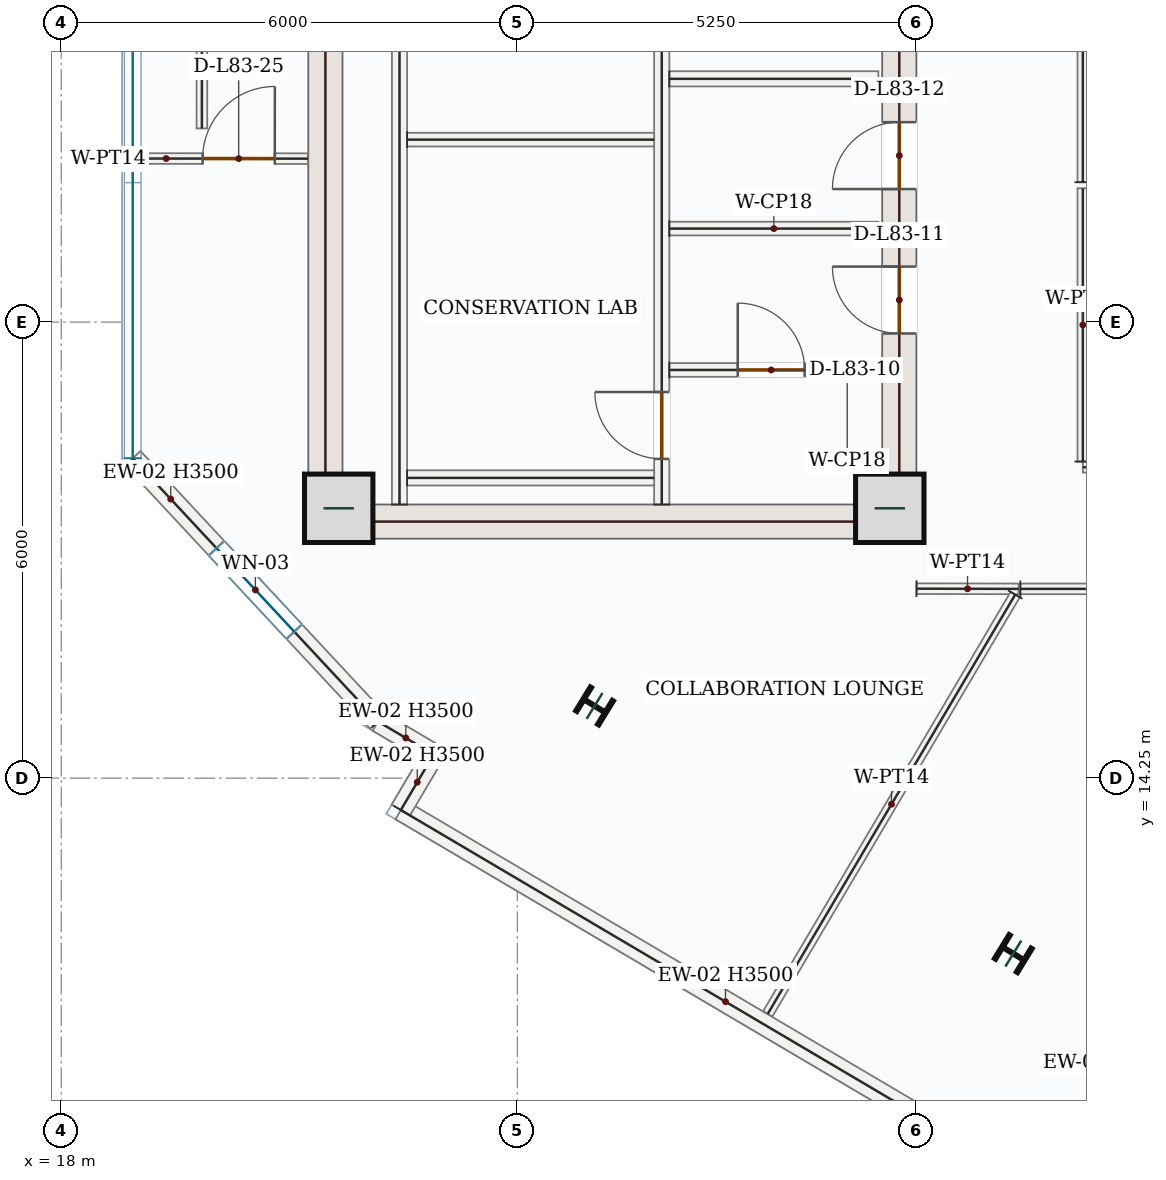
"""IFC4 building model, lengths in metres.
Left out: names, types, materials, properties, quantities, classifications, styles, units other than length and angle.
Written with IfcOpenShell. Run it as: python <this file> out.ifc"""

import sys

from ifc_helpers import new_model, si_unit, direction, frame, frame_2d, origin, origin_2d, place, context, subcontext, project, spatial, rectangle, i_section, extrude, source, transform, mapped, element, fill, save


model = new_model("IFC4")
c1 = context("Model", 3, precision=1e-05, world=origin(), true_north=direction((0.0, 1.0)))
c2 = subcontext(c1, "Body", "Model", "MODEL_VIEW")
j1 = project(units=[si_unit("LENGTHUNIT", "METRE"), si_unit("PLANEANGLEUNIT", "RADIAN")], contexts=[c1])
p1 = place(None, origin())
s1 = spatial("IfcSite", under=j1, at=p1, CompositionType="ELEMENT")
p2 = place(p1, origin())
s2 = spatial("IfcBuilding", under=s1, at=p2, CompositionType="ELEMENT")
p3 = place(p2, frame((0.0, 0.0, 342.3)))
s3 = spatial("IfcBuildingStorey", under=s2, at=p3, CompositionType="ELEMENT", Elevation=342.3)
m1 = source(origin(), c2, "Body", "SweptSolid", [
    extrude(rectangle(XDim=8.55, YDim=0.45, at=frame_2d((4.275, 0.0))), origin(), (0.0, 0.0, 1.0), 3.5),
])
p4 = place(p3, frame((21.475, 17.4, 0.0), z_axis=(0.0, 0.0, 1.0), x_axis=(0.0, 1.0, 0.0)))
e1 = element("IfcWall", 1, at=p4, inside=s3, PredefinedType="SHEAR", context=c2, shape_type="MappedRepresentation", body=[
    mapped(m1, transform((0.0, 0.0, 0.0), x_axis=(1.0, 0.0, 0.0), y_axis=(0.0, 1.0, 0.0), z_axis=(0.0, 0.0, 1.0), scale=1.0)),
])
p5 = place(p3, frame((29.025, 17.4, 0.0), z_axis=(0.0, 0.0, 1.0), x_axis=(0.0, 1.0, 0.0)))
e2 = element("IfcWall", 2, at=p5, inside=s3, PredefinedType="SHEAR", context=c2, shape_type="SweptSolid", body=[
    extrude(rectangle(XDim=8.55, YDim=0.45, at=frame_2d((4.275, 0.0))), origin(), (0.0, 0.0, 1.0), 3.5),
])
p6 = place(p5, frame((6.65, 0.0, 0.0)))
e3 = element("IfcOpeningElement", 3, at=p6, cuts=e2, PredefinedType="OPENING", context=c2, shape_type="SweptSolid", body=[
    extrude(rectangle(XDim=1.1, YDim=2.2, at=frame_2d((0.55, 1.1))), frame((0.0, 0.235, 0.0), z_axis=(0.0, -1.0, 0.0), x_axis=(1.0, 0.0, 0.0)), (0.0, 0.0, 1.0), 0.47),
])
p7 = place(p5, frame((2.7, 0.0, 0.0)))
e4 = element("IfcOpeningElement", 4, at=p7, cuts=e2, PredefinedType="OPENING", context=c2, shape_type="SweptSolid", body=[
    extrude(rectangle(XDim=0.88, YDim=2.1, at=frame_2d((0.44, 1.05))), frame((0.0, 0.235, 0.0), z_axis=(0.0, -1.0, 0.0), x_axis=(1.0, 0.0, 0.0)), (0.0, 0.0, 1.0), 0.47),
])
p8 = place(p5, frame((4.6, 0.0, 0.0)))
e5 = element("IfcOpeningElement", 5, at=p8, cuts=e2, PredefinedType="OPENING", context=c2, shape_type="SweptSolid", body=[
    extrude(rectangle(XDim=0.88, YDim=2.1, at=frame_2d((0.44, 1.05))), frame((0.0, 0.235, 0.0), z_axis=(0.0, -1.0, 0.0), x_axis=(1.0, 0.0, 0.0)), (0.0, 0.0, 1.0), 0.47),
])
m2 = source(origin(), c2, "Body", "SweptSolid", [
    extrude(rectangle(XDim=7.1, YDim=0.45, at=frame_2d((3.55, 0.0))), origin(), (0.0, 0.0, 1.0), 3.5),
])
p9 = place(p3, frame((21.7, 17.625, 0.0), z_axis=(0.0, 0.0, 1.0), x_axis=(1.0, 0.0, 0.0)))
e6 = element("IfcWall", 6, at=p9, inside=s3, PredefinedType="SHEAR", context=c2, shape_type="MappedRepresentation", body=[
    mapped(m2, transform((0.0, 0.0, 0.0), x_axis=(1.0, 0.0, 0.0), y_axis=(0.0, 1.0, 0.0), z_axis=(0.0, 0.0, 1.0), scale=1.0)),
])
m3 = source(origin(), c2, "Body", "SweptSolid", [
    extrude(rectangle(XDim=0.9, YDim=0.9, at=origin_2d()), origin(), (0.0, 0.0, 1.0), 3.75),
])
for number, where, z_axis, x_axis in (
    (7, (21.65, 17.8, 0.0), (0.0, 0.0, 1.0), (1.0, 0.0, 0.0)),
    (8, (28.9, 17.8, 0.0), (0.0, 0.0, 1.0), (1.0, 0.0, 0.0)),
):
    element("IfcColumn", number, at=place(p3, frame(where, z_axis=z_axis, x_axis=x_axis)), inside=s3, PredefinedType="COLUMN", context=c2, shape_type="MappedRepresentation", body=[
        mapped(m3, transform((0.0, 0.0, 0.0), x_axis=(1.0, 0.0, 0.0), y_axis=(0.0, 1.0, 0.0), z_axis=(0.0, 0.0, 1.0), scale=1.0)),
    ])
m4 = source(origin(), c2, "Body", "SweptSolid", [
    extrude(i_section(OverallWidth=0.369, OverallDepth=0.356, WebThickness=0.011, FlangeThickness=0.018, FilletRadius=0.018, at=origin_2d()), origin(), (0.0, 0.0, 1.0), 3.75),
])
for number, where, z_axis, x_axis in (
    (9, (25.016, 15.2, 0.0), (0.0, 0.0, 1.0), (0.522, 0.853, 0.0)),
    (10, (30.525, 11.942, 0.0), (0.0, 0.0, 1.0), (0.522, 0.853, 0.0)),
):
    element("IfcColumn", number, at=place(p3, frame(where, z_axis=z_axis, x_axis=x_axis)), inside=s3, PredefinedType="COLUMN", context=c2, shape_type="MappedRepresentation", body=[
        mapped(m4, transform((0.0, 0.0, 0.0), x_axis=(1.0, 0.0, 0.0), y_axis=(0.0, 1.0, 0.0), z_axis=(0.0, 0.0, 1.0), scale=1.0)),
    ])
m5 = source(origin(), c2, "Body", "SweptSolid", [
    extrude(rectangle(XDim=9.92, YDim=0.28, at=frame_2d((4.96, 0.0))), origin(), (0.0, 0.0, 1.0), 3.5),
])
p10 = place(p3, frame((31.01, 8.788, 0.0), z_axis=(0.0, 0.0, 1.0), x_axis=(-0.861192451778, 0.508279018848, 0.0)))
e11 = element("IfcWall", 11, at=p10, inside=s3, PredefinedType="SOLIDWALL", context=c2, shape_type="MappedRepresentation", body=[
    mapped(m5, transform((0.0, 0.0, 0.0), x_axis=(1.0, 0.0, 0.0), y_axis=(0.0, 1.0, 0.0), z_axis=(0.0, 0.0, 1.0), scale=1.0)),
])
m6 = source(origin(), c2, "Body", "SweptSolid", [
    extrude(rectangle(XDim=0.85, YDim=0.28, at=frame_2d((0.425, 0.0))), origin(), (0.0, 0.0, 1.0), 3.5),
])
for number, where, z_axis, x_axis in (
    (12, (22.467, 13.83, 0.0), (0.0, 0.0, 1.0), (0.508, 0.861, 0.0)),
    (13, (22.899, 14.562, 0.0), (0.0, 0.0, 1.0), (-0.861, 0.508, 0.0)),
):
    element("IfcWall", number, at=place(p3, frame(where, z_axis=z_axis, x_axis=x_axis)), inside=s3, PredefinedType="SOLIDWALL", context=c2, shape_type="MappedRepresentation", body=[
        mapped(m6, transform((0.0, 0.0, 0.0), x_axis=(1.0, 0.0, 0.0), y_axis=(0.0, 1.0, 0.0), z_axis=(0.0, 0.0, 1.0), scale=1.0)),
    ])
p11 = place(p3, frame((22.167, 14.994, 0.0), z_axis=(0.0, 0.0, 1.0), x_axis=(-0.681733754317, 0.731600361006, 0.0)))
e14 = element("IfcWall", 14, at=p11, inside=s3, PredefinedType="SOLIDWALL", context=c2, shape_type="SweptSolid", body=[
    extrude(rectangle(XDim=4.734, YDim=0.28, at=frame_2d((2.367, 0.0))), origin(), (0.0, 0.0, 1.0), 3.5),
])
p12 = place(p11, frame((1.617, 0.0, 0.85)))
e15 = element("IfcOpeningElement", 15, at=p12, cuts=e14, PredefinedType="OPENING", context=c2, shape_type="SweptSolid", body=[
    extrude(rectangle(XDim=1.5, YDim=1.5, at=frame_2d((0.75, 0.75))), frame((0.0, 0.15, 0.0), z_axis=(0.0, -1.0, 0.0), x_axis=(1.0, 0.0, 0.0)), (0.0, 0.0, 1.0), 0.3),
])
m7 = source(origin(), c2, "Body", "SweptSolid", [
    extrude(rectangle(XDim=7.87, YDim=0.2, at=frame_2d((3.935, 0.0))), origin(), (0.0, 0.0, 1.0), 3.5),
])
p13 = place(p3, frame((22.45, 17.85, 0.0), z_axis=(0.0, 0.0, 1.0), x_axis=(0.0, 1.0, 0.0)))
e16 = element("IfcWall", 16, at=p13, inside=s3, PredefinedType="SOLIDWALL", context=c2, shape_type="MappedRepresentation", body=[
    mapped(m7, transform((0.0, 0.0, 0.0), x_axis=(1.0, 0.0, 0.0), y_axis=(0.0, 1.0, 0.0), z_axis=(0.0, 0.0, 1.0), scale=1.0)),
])
p14 = place(p3, frame((25.9, 17.85, 0.0), z_axis=(0.0, 0.0, 1.0), x_axis=(0.0, 1.0, 0.0)))
e17 = element("IfcWall", 17, at=p14, inside=s3, PredefinedType="SOLIDWALL", context=c2, shape_type="SweptSolid", body=[
    extrude(rectangle(XDim=8.0, YDim=0.2, at=frame_2d((4.0, 0.0))), origin(), (0.0, 0.0, 1.0), 3.5),
])
p15 = place(p14, frame((6.2, 0.0, 0.0)))
e18 = element("IfcOpeningElement", 18, at=p15, cuts=e17, PredefinedType="OPENING", context=c2, shape_type="SweptSolid", body=[
    extrude(rectangle(XDim=1.0, YDim=2.15, at=frame_2d((0.5, 1.075))), frame((0.0, 0.11, 0.0), z_axis=(0.0, -1.0, 0.0), x_axis=(1.0, 0.0, 0.0)), (0.0, 0.0, 1.0), 0.22),
])
p16 = place(p14, frame((0.6, 0.0, 0.0)))
e19 = element("IfcOpeningElement", 19, at=p16, cuts=e17, PredefinedType="OPENING", context=c2, shape_type="SweptSolid", body=[
    extrude(rectangle(XDim=0.88, YDim=2.1, at=frame_2d((0.44, 1.05))), frame((0.0, 0.11, 0.0), z_axis=(0.0, -1.0, 0.0), x_axis=(1.0, 0.0, 0.0)), (0.0, 0.0, 1.0), 0.22),
])
m8 = source(origin(), c2, "Body", "SweptSolid", [
    extrude(rectangle(XDim=3.25, YDim=0.2, at=frame_2d((1.625, 0.0))), origin(), (0.0, 0.0, 1.0), 3.5),
])
p17 = place(p3, frame((22.55, 18.2, 0.0), z_axis=(0.0, 0.0, 1.0), x_axis=(1.0, 0.0, 0.0)))
e20 = element("IfcWall", 20, at=p17, inside=s3, PredefinedType="SOLIDWALL", context=c2, shape_type="MappedRepresentation", body=[
    mapped(m8, transform((0.0, 0.0, 0.0), x_axis=(1.0, 0.0, 0.0), y_axis=(0.0, 1.0, 0.0), z_axis=(0.0, 0.0, 1.0), scale=1.0)),
])
m9 = source(origin(), c2, "Body", "SweptSolid", [
    extrude(rectangle(XDim=3.25, YDim=0.18, at=frame_2d((1.625, 0.0))), origin(), (0.0, 0.0, 1.0), 3.5),
])
p18 = place(p3, frame((22.55, 22.65, 0.0), z_axis=(0.0, 0.0, 1.0), x_axis=(1.0, 0.0, 0.0)))
e21 = element("IfcWall", 21, at=p18, inside=s3, PredefinedType="PARTITIONING", context=c2, shape_type="MappedRepresentation", body=[
    mapped(m9, transform((0.0, 0.0, 0.0), x_axis=(1.0, 0.0, 0.0), y_axis=(0.0, 1.0, 0.0), z_axis=(0.0, 0.0, 1.0), scale=1.0)),
])
m10 = source(origin(), c2, "Body", "SweptSolid", [
    extrude(rectangle(XDim=2.75, YDim=0.2, at=frame_2d((1.375, 0.0))), origin(), (0.0, 0.0, 1.0), 3.5),
])
p19 = place(p3, frame((26.0, 23.45, 0.0), z_axis=(0.0, 0.0, 1.0), x_axis=(1.0, 0.0, 0.0)))
e22 = element("IfcWall", 22, at=p19, inside=s3, PredefinedType="SOLIDWALL", context=c2, shape_type="MappedRepresentation", body=[
    mapped(m10, transform((0.0, 0.0, 0.0), x_axis=(1.0, 0.0, 0.0), y_axis=(0.0, 1.0, 0.0), z_axis=(0.0, 0.0, 1.0), scale=1.0)),
])
p20 = place(p3, frame((26.0, 19.62, 0.0), z_axis=(0.0, 0.0, 1.0), x_axis=(1.0, 0.0, 0.0)))
e23 = element("IfcWall", 23, at=p20, inside=s3, PredefinedType="PARTITIONING", context=c2, shape_type="SweptSolid", body=[
    extrude(rectangle(XDim=2.75, YDim=0.18, at=frame_2d((1.375, 0.0))), origin(), (0.0, 0.0, 1.0), 3.5),
])
p21 = place(p20, frame((0.9, 0.0, 0.0)))
e24 = element("IfcOpeningElement", 24, at=p21, cuts=e23, PredefinedType="OPENING", context=c2, shape_type="SweptSolid", body=[
    extrude(rectangle(XDim=0.88, YDim=2.1, at=frame_2d((0.44, 1.05))), frame((0.0, 0.1, 0.0), z_axis=(0.0, -1.0, 0.0), x_axis=(1.0, 0.0, 0.0)), (0.0, 0.0, 1.0), 0.2),
])
m11 = source(origin(), c2, "Body", "SweptSolid", [
    extrude(rectangle(XDim=2.75, YDim=0.18, at=frame_2d((1.375, 0.0))), origin(), (0.0, 0.0, 1.0), 3.5),
])
p22 = place(p3, frame((26.0, 21.48, 0.0), z_axis=(0.0, 0.0, 1.0), x_axis=(1.0, 0.0, 0.0)))
e25 = element("IfcWall", 25, at=p22, inside=s3, PredefinedType="PARTITIONING", context=c2, shape_type="MappedRepresentation", body=[
    mapped(m11, transform((0.0, 0.0, 0.0), x_axis=(1.0, 0.0, 0.0), y_axis=(0.0, 1.0, 0.0), z_axis=(0.0, 0.0, 1.0), scale=1.0)),
])
p23 = place(p3, frame((35.91, 18.34, 0.0), z_axis=(0.0, 0.0, 1.0), x_axis=(-1.0, 0.0, 0.0)))
e26 = element("IfcWall", 26, at=p23, inside=s3, PredefinedType="PARTITIONING", context=c2, shape_type="SweptSolid", body=[
    extrude(rectangle(XDim=4.47, YDim=0.14, at=frame_2d((2.235, 0.0))), origin(), (0.0, 0.0, 1.0), 3.5),
])
p24 = place(p23, frame((0.774, 0.0, 0.0)))
e27 = element("IfcOpeningElement", 27, at=p24, cuts=e26, PredefinedType="OPENING", context=c2, shape_type="SweptSolid", body=[
    extrude(rectangle(XDim=0.95, YDim=2.15, at=frame_2d((0.475, 1.075))), frame((0.0, 0.08, 0.0), z_axis=(0.0, -1.0, 0.0), x_axis=(1.0, 0.0, 0.0)), (0.0, 0.0, 1.0), 0.16),
])
m12 = source(origin(), c2, "Body", "SweptSolid", [
    extrude(rectangle(XDim=3.595, YDim=0.14, at=frame_2d((1.797, 0.0))), origin(), (0.0, 0.0, 1.0), 3.5),
])
p25 = place(p3, frame((31.44, 18.415, 0.0), z_axis=(0.0, 0.0, 1.0), x_axis=(0.0, 1.0, 0.0)))
e28 = element("IfcWall", 28, at=p25, inside=s3, PredefinedType="PARTITIONING", context=c2, shape_type="MappedRepresentation", body=[
    mapped(m12, transform((0.0, 0.0, 0.0), x_axis=(1.0, 0.0, 0.0), y_axis=(0.0, 1.0, 0.0), z_axis=(0.0, 0.0, 1.0), scale=1.0)),
])
m13 = source(origin(), c2, "Body", "SweptSolid", [
    extrude(rectangle(XDim=3.72, YDim=0.14, at=frame_2d((1.86, 0.0))), origin(), (0.0, 0.0, 1.0), 3.5),
])
p26 = place(p3, frame((31.44, 22.09, 0.0), z_axis=(0.0, 0.0, 1.0), x_axis=(0.0, 1.0, 0.0)))
e29 = element("IfcWall", 29, at=p26, inside=s3, PredefinedType="PARTITIONING", context=c2, shape_type="MappedRepresentation", body=[
    mapped(m13, transform((0.0, 0.0, 0.0), x_axis=(1.0, 0.0, 0.0), y_axis=(0.0, 1.0, 0.0), z_axis=(0.0, 0.0, 1.0), scale=1.0)),
])
p27 = place(p3, frame((19.05, 22.402, 0.0), z_axis=(0.0, 0.0, 1.0), x_axis=(0.999999696925, -0.000778556098, 0.0)))
e30 = element("IfcWall", 30, at=p27, inside=s3, PredefinedType="PARTITIONING", context=c2, shape_type="SweptSolid", body=[
    extrude(rectangle(XDim=2.195, YDim=0.14, at=frame_2d((1.098, 0.0))), origin(), (0.0, 0.0, 1.0), 3.5),
])
p28 = place(p27, frame((0.809, 0.0, 0.0)))
e31 = element("IfcOpeningElement", 31, at=p28, cuts=e30, PredefinedType="OPENING", context=c2, shape_type="SweptSolid", body=[
    extrude(rectangle(XDim=0.95, YDim=2.15, at=frame_2d((0.475, 1.075))), frame((0.0, 0.08, 0.0), z_axis=(0.0, -1.0, 0.0), x_axis=(1.0, 0.0, 0.0)), (0.0, 0.0, 1.0), 0.16),
])
m14 = source(origin(), c2, "Body", "SweptSolid", [
    extrude(rectangle(XDim=1.343, YDim=0.14, at=frame_2d((0.671, 0.0))), origin(), (0.0, 0.0, 1.0), 3.5),
])
p29 = place(p3, frame((29.252, 16.743, 0.0), z_axis=(0.0, 0.0, 1.0), x_axis=(0.999997619843, -0.002181812989, 0.0)))
e32 = element("IfcWall", 32, at=p29, inside=s3, PredefinedType="PARTITIONING", context=c2, shape_type="MappedRepresentation", body=[
    mapped(m14, transform((0.0, 0.0, 0.0), x_axis=(1.0, 0.0, 0.0), y_axis=(0.0, 1.0, 0.0), z_axis=(0.0, 0.0, 1.0), scale=1.0)),
])
m15 = source(origin(), c2, "Body", "SweptSolid", [
    extrude(rectangle(XDim=6.405, YDim=0.14, at=frame_2d((3.202, 0.0))), origin(), (0.0, 0.0, 1.0), 3.5),
])
p30 = place(p3, frame((30.55, 16.665, 0.0), z_axis=(0.0, 0.0, 1.0), x_axis=(-0.508299006291, -0.861180654801, 0.0)))
e33 = element("IfcWall", 33, at=p30, inside=s3, PredefinedType="PARTITIONING", context=c2, shape_type="MappedRepresentation", body=[
    mapped(m15, transform((0.0, 0.0, 0.0), x_axis=(1.0, 0.0, 0.0), y_axis=(0.0, 1.0, 0.0), z_axis=(0.0, 0.0, 1.0), scale=1.0)),
])
p31 = place(p3, frame((30.618, 16.74, 0.0), z_axis=(0.0, 0.0, 1.0), x_axis=(1.0, 0.0, 0.0)))
e34 = element("IfcWall", 34, at=p31, inside=s3, PredefinedType="PARTITIONING", context=c2, shape_type="SweptSolid", body=[
    extrude(rectangle(XDim=8.014, YDim=0.14, at=frame_2d((4.007, 0.0))), origin(), (0.0, 0.0, 1.0), 3.5),
])
p32 = place(p31, frame((4.592, 0.0, 0.0)))
e35 = element("IfcOpeningElement", 35, at=p32, cuts=e34, PredefinedType="OPENING", context=c2, shape_type="SweptSolid", body=[
    extrude(rectangle(XDim=0.95, YDim=2.15, at=frame_2d((0.475, 1.075))), frame((0.0, 0.08, 0.0), z_axis=(0.0, -1.0, 0.0), x_axis=(1.0, 0.0, 0.0)), (0.0, 0.0, 1.0), 0.16),
])
p33 = place(p3, frame((19.853, 31.598, 0.0), z_axis=(0.0, 0.0, 1.0), x_axis=(-0.00027740789, -0.999999961522, 0.0)))
e36 = element("IfcWall", 36, at=p33, inside=s3, PredefinedType="PARTITIONING", context=c2, shape_type="SweptSolid", body=[
    extrude(rectangle(XDim=8.801, YDim=0.14, at=frame_2d((4.4, 0.0))), origin(), (0.0, 0.0, 1.0), 3.5),
])
p34 = place(p33, frame((5.103, 0.0, 0.0)))
e37 = element("IfcOpeningElement", 37, at=p34, cuts=e36, PredefinedType="OPENING", context=c2, shape_type="SweptSolid", body=[
    extrude(rectangle(XDim=0.95, YDim=2.15, at=frame_2d((0.475, 1.075))), frame((0.0, 0.08, 0.0), z_axis=(0.0, -1.0, 0.0), x_axis=(1.0, 0.0, 0.0)), (0.0, 0.0, 1.0), 0.16),
])
m16 = source(origin(), c2, "Body", "SweptSolid", [
    extrude(rectangle(XDim=1.5, YDim=1.5, at=frame_2d((0.75, 0.75))), frame((0.0, 0.03, 0.0), z_axis=(0.0, -1.0, 0.0), x_axis=(1.0, 0.0, 0.0)), (0.0, 0.0, 1.0), 0.06),
])
p35 = place(p12, origin())
e38 = element("IfcWindow", 38, at=p35, inside=s3, PartitioningType="SINGLE_PANEL", PredefinedType="WINDOW", context=c2, shape_type="MappedRepresentation", body=[
    mapped(m16, transform((0.0, 0.0, 0.0), x_axis=(1.0, 0.0, 0.0), y_axis=(0.0, 1.0, 0.0), z_axis=(0.0, 0.0, 1.0), scale=1.0)),
])
fill(e15, e38)
m17 = source(origin(), c2, "Body", "SweptSolid", [
    extrude(rectangle(XDim=0.88, YDim=2.1, at=frame_2d((0.44, 1.05))), frame((0.0, 0.025, 0.0), z_axis=(0.0, -1.0, 0.0), x_axis=(1.0, 0.0, 0.0)), (0.0, 0.0, 1.0), 0.05),
])
p36 = place(p16, origin())
e39 = element("IfcDoor", 39, at=p36, inside=s3, OperationType="SINGLE_SWING_RIGHT", PredefinedType="DOOR", context=c2, shape_type="MappedRepresentation", body=[
    mapped(m17, transform((0.0, 0.0, 0.0), x_axis=(1.0, 0.0, 0.0), y_axis=(0.0, 1.0, 0.0), z_axis=(0.0, 0.0, 1.0), scale=1.0)),
])
fill(e19, e39)
p37 = place(p21, origin())
e40 = element("IfcDoor", 40, at=p37, inside=s3, OperationType="SINGLE_SWING_LEFT", PredefinedType="DOOR", context=c2, shape_type="MappedRepresentation", body=[
    mapped(m17, transform((0.0, 0.0, 0.0), x_axis=(1.0, 0.0, 0.0), y_axis=(0.0, 1.0, 0.0), z_axis=(0.0, 0.0, 1.0), scale=1.0)),
])
fill(e24, e40)
p38 = place(p7, origin())
e41 = element("IfcDoor", 41, at=p38, inside=s3, OperationType="SINGLE_SWING_RIGHT", PredefinedType="DOOR", context=c2, shape_type="MappedRepresentation", body=[
    mapped(m17, transform((0.0, 0.0, 0.0), x_axis=(1.0, 0.0, 0.0), y_axis=(0.0, 1.0, 0.0), z_axis=(0.0, 0.0, 1.0), scale=1.0)),
])
fill(e4, e41)
p39 = place(p8, origin())
e42 = element("IfcDoor", 42, at=p39, inside=s3, OperationType="SINGLE_SWING_LEFT", PredefinedType="DOOR", context=c2, shape_type="MappedRepresentation", body=[
    mapped(m17, transform((0.0, 0.0, 0.0), x_axis=(1.0, 0.0, 0.0), y_axis=(0.0, 1.0, 0.0), z_axis=(0.0, 0.0, 1.0), scale=1.0)),
])
fill(e5, e42)
m18 = source(origin(), c2, "Body", "SweptSolid", [
    extrude(rectangle(XDim=0.95, YDim=2.15, at=frame_2d((0.475, 1.075))), frame((0.0, 0.025, 0.0), z_axis=(0.0, -1.0, 0.0), x_axis=(1.0, 0.0, 0.0)), (0.0, 0.0, 1.0), 0.05),
])
p40 = place(p28, origin())
e43 = element("IfcDoor", 43, at=p40, inside=s3, OperationType="SINGLE_SWING_RIGHT", PredefinedType="DOOR", context=c2, shape_type="MappedRepresentation", body=[
    mapped(m18, transform((0.0, 0.0, 0.0), x_axis=(1.0, 0.0, 0.0), y_axis=(0.0, 1.0, 0.0), z_axis=(0.0, 0.0, 1.0), scale=1.0)),
])
fill(e31, e43)
save(model, sys.argv[1])
